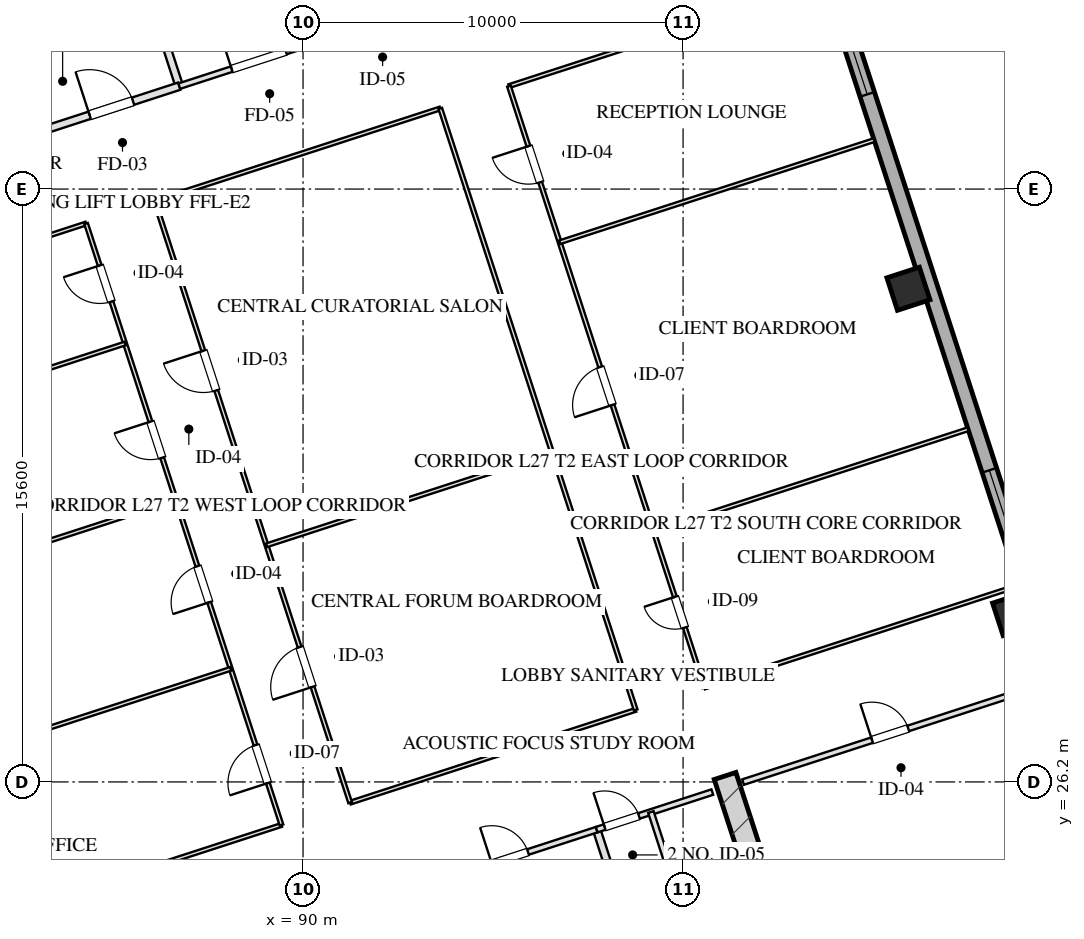
"""IFC4 building model, lengths in metres.
Left out: names, types, materials, properties, quantities, classifications, styles, units other than length and angle.
Written with IfcOpenShell. Run it as: python <this file> out.ifc"""

import sys

from ifc_helpers import new_model, si_unit, direction, frame, frame_2d, origin, origin_2d, place, context, subcontext, project, spatial, rectangle, hollow_rectangle, extrude, element, fill, save


model = new_model("IFC4")
c1 = context("Model", 3, precision=1e-05, world=origin(), true_north=direction((0.0, 1.0)))
c2 = subcontext(c1, "Body", "Model", "MODEL_VIEW")
j1 = project(units=[si_unit("LENGTHUNIT", "METRE"), si_unit("PLANEANGLEUNIT", "RADIAN")], contexts=[c1])
p1 = place(None, origin())
s1 = spatial("IfcSite", under=j1, at=p1, CompositionType="ELEMENT")
p2 = place(p1, origin())
s2 = spatial("IfcBuilding", under=s1, at=p2, CompositionType="ELEMENT")
p3 = place(p2, frame((0.0, 0.0, 106.95)))
s3 = spatial("IfcBuildingStorey", under=s2, at=p3, CompositionType="ELEMENT", Elevation=106.95)
p4 = place(p3, frame((101.105, 26.358, 0.0), z_axis=(0.0, 0.0, 1.0), x_axis=(0.309010370028, -0.95105866865, 0.0)))
e1 = element("IfcWall", 1, at=p4, inside=s3, PredefinedType="SHEAR", context=c2, shape_type="SweptSolid", body=[
    extrude(rectangle(XDim=9.48, YDim=0.6, at=frame_2d((4.74, 0.0))), origin(), (0.0, 0.0, 1.0), 3.45),
])
for number, where, z_axis, x_axis in (
    (2, (108.711, 30.616, 0.0), (0.0, 0.0, 1.0), (0.951, 0.309, 0.0)),
    (3, (105.93, 39.176, 0.0), (0.0, 0.0, 1.0), (0.951, 0.309, 0.0)),
):
    element("IfcColumn", number, at=place(p3, frame(where, z_axis=z_axis, x_axis=x_axis)), inside=s3, PredefinedType="COLUMN", context=c2, shape_type="SweptSolid", body=[
        extrude(hollow_rectangle(XDim=0.9, YDim=0.9, WallThickness=0.032, at=origin_2d()), origin(), (0.0, 0.0, 1.0), 3.451),
    ])
p5 = place(p3, frame((99.284, 61.41, 0.0), z_axis=(0.0, 0.0, 1.0), x_axis=(0.309017542002, -0.95105633836, 0.0)))
e4 = element("IfcWall", 4, at=p5, inside=s3, PredefinedType="SOLIDWALL", context=c2, shape_type="SweptSolid", body=[
    extrude(rectangle(XDim=46.4, YDim=0.4, at=frame_2d((23.2, 0.0))), origin(), (0.0, 0.0, 1.0), 2.61),
])
p6 = place(p5, frame((28.4, 0.0, 0.75)))
e5 = element("IfcOpeningElement", 5, at=p6, cuts=e4, PredefinedType="OPENING", context=c2, shape_type="SweptSolid", body=[
    extrude(rectangle(XDim=2.4, YDim=1.46, at=frame_2d((1.2, 0.73))), frame((0.0, 0.21, 0.0), z_axis=(0.0, -1.0, 0.0), x_axis=(1.0, 0.0, 0.0)), (0.0, 0.0, 1.0), 0.42),
])
p7 = place(p5, frame((15.6, 0.0, 0.75)))
e6 = element("IfcOpeningElement", 6, at=p7, cuts=e4, PredefinedType="OPENING", context=c2, shape_type="SweptSolid", body=[
    extrude(rectangle(XDim=2.4, YDim=1.46, at=frame_2d((1.2, 0.73))), frame((0.0, 0.21, 0.0), z_axis=(0.0, -1.0, 0.0), x_axis=(1.0, 0.0, 0.0)), (0.0, 0.0, 1.0), 0.42),
])
p8 = place(p3, frame((97.727, 24.944, 0.0), z_axis=(0.0, 0.0, 1.0), x_axis=(0.309016001439, -0.951056838919, 0.0)))
e7 = element("IfcWall", 7, at=p8, inside=s3, PredefinedType="PARTITIONING", context=c2, shape_type="SweptSolid", body=[
    extrude(rectangle(XDim=8.43, YDim=0.2, at=frame_2d((4.215, 0.0))), origin(), (0.0, 0.0, 1.0), 3.175),
])
p9 = place(p3, frame((93.542, 23.585, 0.0), z_axis=(0.0, 0.0, 1.0), x_axis=(0.951063829732, 0.308994485023, 0.0)))
e8 = element("IfcWall", 8, at=p9, inside=s3, PredefinedType="PARTITIONING", context=c2, shape_type="SweptSolid", body=[
    extrude(rectangle(XDim=4.4, YDim=0.15, at=frame_2d((2.2, 0.0))), origin(), (0.0, 0.0, 1.0), 3.175),
])
p10 = place(p9, frame((1.5, 0.0, 0.0)))
e9 = element("IfcOpeningElement", 9, at=p10, cuts=e8, PredefinedType="OPENING", context=c2, shape_type="SweptSolid", body=[
    extrude(rectangle(XDim=1.0, YDim=2.05, at=frame_2d((0.5, 1.025))), frame((0.0, 0.085, 0.0), z_axis=(0.0, -1.0, 0.0), x_axis=(1.0, 0.0, 0.0)), (0.0, 0.0, 1.0), 0.17),
])
p11 = place(p3, frame((97.727, 24.944, 0.0), z_axis=(0.0, 0.0, 1.0), x_axis=(0.951036872128, 0.309077446369, 0.0)))
e10 = element("IfcWall", 10, at=p11, inside=s3, PredefinedType="PARTITIONING", context=c2, shape_type="SweptSolid", body=[
    extrude(rectangle(XDim=3.2, YDim=0.15, at=frame_2d((1.6, 0.0))), origin(), (0.0, 0.0, 1.0), 3.175),
])
p12 = place(p11, frame((0.22, 0.0, 0.0)))
e11 = element("IfcOpeningElement", 11, at=p12, cuts=e10, PredefinedType="OPENING", context=c2, shape_type="SweptSolid", body=[
    extrude(rectangle(XDim=0.95, YDim=2.05, at=frame_2d((0.475, 1.025))), frame((0.0, 0.085, 0.0), z_axis=(0.0, -1.0, 0.0), x_axis=(1.0, 0.0, 0.0)), (0.0, 0.0, 1.0), 0.17),
])
p13 = place(p3, frame((99.153, 25.408, 0.0), z_axis=(0.0, 0.0, 1.0), x_axis=(0.309016001439, -0.951056838919, 0.0)))
e12 = element("IfcWall", 12, at=p13, inside=s3, PredefinedType="PARTITIONING", context=c2, shape_type="SweptSolid", body=[
    extrude(rectangle(XDim=8.43, YDim=0.15, at=frame_2d((4.215, 0.0))), origin(), (0.0, 0.0, 1.0), 3.175),
])
p14 = place(p13, frame((2.55, 0.0, 0.0)))
e13 = element("IfcOpeningElement", 13, at=p14, cuts=e12, PredefinedType="OPENING", context=c2, shape_type="SweptSolid", body=[
    extrude(rectangle(XDim=0.95, YDim=2.05, at=frame_2d((0.475, 1.025))), frame((0.0, 0.085, 0.0), z_axis=(0.0, -1.0, 0.0), x_axis=(1.0, 0.0, 0.0)), (0.0, 0.0, 1.0), 0.17),
])
p15 = place(p13, frame((4.7, 0.0, 0.0)))
e14 = element("IfcOpeningElement", 14, at=p15, cuts=e12, PredefinedType="OPENING", context=c2, shape_type="SweptSolid", body=[
    extrude(rectangle(XDim=0.9, YDim=2.05, at=frame_2d((0.45, 1.025))), frame((0.0, 0.085, 0.0), z_axis=(0.0, -1.0, 0.0), x_axis=(1.0, 0.0, 0.0)), (0.0, 0.0, 1.0), 0.17),
])
p16 = place(p13, frame((6.8, 0.0, 0.0)))
e15 = element("IfcOpeningElement", 15, at=p16, cuts=e12, PredefinedType="OPENING", context=c2, shape_type="SweptSolid", body=[
    extrude(rectangle(XDim=0.9, YDim=2.05, at=frame_2d((0.45, 1.025))), frame((0.0, 0.085, 0.0), z_axis=(0.0, -1.0, 0.0), x_axis=(1.0, 0.0, 0.0)), (0.0, 0.0, 1.0), 0.17),
])
p17 = place(p3, frame((86.743, 44.508, 0.0), z_axis=(0.0, 0.0, 1.0), x_axis=(-0.309016001439, 0.951056838919, 0.0)))
e16 = element("IfcWall", 16, at=p17, inside=s3, PredefinedType="PARTITIONING", context=c2, shape_type="SweptSolid", body=[
    extrude(rectangle(XDim=8.43, YDim=0.2, at=frame_2d((4.215, 0.0))), origin(), (0.0, 0.0, 1.0), 3.175),
])
p18 = place(p3, frame((83.101, 43.324, 0.0), z_axis=(0.0, 0.0, 1.0), x_axis=(0.951052804469, 0.309028417967, 0.0)))
e17 = element("IfcWall", 17, at=p18, inside=s3, PredefinedType="PARTITIONING", context=c2, shape_type="SweptSolid", body=[
    extrude(rectangle(XDim=3.83, YDim=0.2, at=frame_2d((1.915, 0.0))), origin(), (0.0, 0.0, 1.0), 3.175),
])
p19 = place(p18, frame((1.35, 0.0, 0.0)))
e18 = element("IfcOpeningElement", 18, at=p19, cuts=e17, PredefinedType="OPENING", context=c2, shape_type="SweptSolid", body=[
    extrude(rectangle(XDim=1.2, YDim=2.05, at=frame_2d((0.6, 1.025))), frame((0.0, 0.11, 0.0), z_axis=(0.0, -1.0, 0.0), x_axis=(1.0, 0.0, 0.0)), (0.0, 0.0, 1.0), 0.22),
])
p20 = place(p3, frame((86.743, 44.508, 0.0), z_axis=(0.0, 0.0, 1.0), x_axis=(0.951063829732, 0.308994485023, 0.0)))
e19 = element("IfcWall", 19, at=p20, inside=s3, PredefinedType="PARTITIONING", context=c2, shape_type="SweptSolid", body=[
    extrude(rectangle(XDim=4.4, YDim=0.15, at=frame_2d((2.2, 0.0))), origin(), (0.0, 0.0, 1.0), 3.175),
])
p21 = place(p20, frame((1.45, 0.0, 0.0)))
e20 = element("IfcOpeningElement", 20, at=p21, cuts=e19, PredefinedType="OPENING", context=c2, shape_type="SweptSolid", body=[
    extrude(rectangle(XDim=1.5, YDim=2.05, at=frame_2d((0.75, 1.025))), frame((0.0, 0.085, 0.0), z_axis=(0.0, -1.0, 0.0), x_axis=(1.0, 0.0, 0.0)), (0.0, 0.0, 1.0), 0.17),
])
p22 = place(p3, frame((101.578, 26.196, 0.0), z_axis=(0.0, 0.0, 1.0), x_axis=(0.951062770994, 0.308997743729, 0.0)))
e21 = element("IfcWall", 21, at=p22, inside=s3, PredefinedType="PARTITIONING", context=c2, shape_type="SweptSolid", body=[
    extrude(rectangle(XDim=8.5, YDim=0.15, at=frame_2d((4.25, 0.0))), origin(), (0.0, 0.0, 1.0), 3.175),
])
p23 = place(p22, frame((3.57, 0.0, 0.0)))
e22 = element("IfcOpeningElement", 22, at=p23, cuts=e21, PredefinedType="OPENING", context=c2, shape_type="SweptSolid", body=[
    extrude(rectangle(XDim=1.0, YDim=2.05, at=frame_2d((0.5, 1.025))), frame((0.0, 0.085, 0.0), z_axis=(0.0, -1.0, 0.0), x_axis=(1.0, 0.0, 0.0)), (0.0, 0.0, 1.0), 0.17),
])
p24 = place(p3, frame((76.308, 20.803, 0.0), z_axis=(0.0, 0.0, 1.0), x_axis=(0.951058377365, 0.309011266531, 0.0)))
e23 = element("IfcWall", 23, at=p24, inside=s3, PredefinedType="MOVABLE", context=c2, shape_type="SweptSolid", body=[
    extrude(rectangle(XDim=13.8, YDim=0.1, at=frame_2d((6.9, 0.0))), origin(), (0.0, 0.0, 1.0), 3.175),
])
p25 = place(p3, frame((91.24, 25.655, 0.0), z_axis=(0.0, 0.0, 1.0), x_axis=(0.951060182336, 0.309005711233, 0.0)))
e24 = element("IfcWall", 24, at=p25, inside=s3, PredefinedType="MOVABLE", context=c2, shape_type="SweptSolid", body=[
    extrude(rectangle(XDim=7.9, YDim=0.1, at=frame_2d((3.95, 0.0))), origin(), (0.0, 0.0, 1.0), 3.175),
])
p26 = place(p3, frame((100.56, 28.683, 0.0), z_axis=(0.0, 0.0, 1.0), x_axis=(0.951055307445, 0.309020714809, 0.0)))
e25 = element("IfcWall", 25, at=p26, inside=s3, PredefinedType="MOVABLE", context=c2, shape_type="SweptSolid", body=[
    extrude(rectangle(XDim=8.7, YDim=0.1, at=frame_2d((4.35, 0.0))), origin(), (0.0, 0.0, 1.0), 3.175),
])
p27 = place(p3, frame((71.166, 36.629, 0.0), z_axis=(0.0, 0.0, 1.0), x_axis=(0.951056688031, 0.309016465825, 0.0)))
e26 = element("IfcWall", 26, at=p27, inside=s3, PredefinedType="MOVABLE", context=c2, shape_type="SweptSolid", body=[
    extrude(rectangle(XDim=13.8, YDim=0.1, at=frame_2d((6.9, 0.0))), origin(), (0.0, 0.0, 1.0), 3.175),
])
p28 = place(p3, frame((86.097, 41.48, 0.0), z_axis=(0.0, 0.0, 1.0), x_axis=(0.951060182336, 0.309005711233, 0.0)))
e27 = element("IfcWall", 27, at=p28, inside=s3, PredefinedType="MOVABLE", context=c2, shape_type="SweptSolid", body=[
    extrude(rectangle(XDim=7.9, YDim=0.1, at=frame_2d((3.95, 0.0))), origin(), (0.0, 0.0, 1.0), 3.175),
])
p29 = place(p3, frame((95.418, 44.509, 0.0), z_axis=(0.0, 0.0, 1.0), x_axis=(0.951055307445, 0.309020714809, 0.0)))
e28 = element("IfcWall", 28, at=p29, inside=s3, PredefinedType="MOVABLE", context=c2, shape_type="SweptSolid", body=[
    extrude(rectangle(XDim=8.7, YDim=0.1, at=frame_2d((4.35, 0.0))), origin(), (0.0, 0.0, 1.0), 3.175),
])
p30 = place(p3, frame((89.433, 25.067, 0.0), z_axis=(0.0, 0.0, 1.0), x_axis=(-0.30901773025, 0.951056277195, 0.0)))
e29 = element("IfcWall", 29, at=p30, inside=s3, PredefinedType="MOVABLE", context=c2, shape_type="SweptSolid", body=[
    extrude(rectangle(XDim=16.64, YDim=0.1, at=frame_2d((8.32, 0.0))), origin(), (0.0, 0.0, 1.0), 3.175),
])
p31 = place(p30, frame((1.16, 0.0, 0.0)))
e30 = element("IfcOpeningElement", 30, at=p31, cuts=e29, PredefinedType="OPENING", context=c2, shape_type="SweptSolid", body=[
    extrude(rectangle(XDim=1.05, YDim=2.05, at=frame_2d((0.525, 1.025))), frame((0.0, 0.06, 0.0), z_axis=(0.0, -1.0, 0.0), x_axis=(1.0, 0.0, 0.0)), (0.0, 0.0, 1.0), 0.12),
])
p32 = place(p30, frame((6.16, 0.0, 0.0)))
e31 = element("IfcOpeningElement", 31, at=p32, cuts=e29, PredefinedType="OPENING", context=c2, shape_type="SweptSolid", body=[
    extrude(rectangle(XDim=1.0, YDim=2.05, at=frame_2d((0.5, 1.025))), frame((0.0, 0.06, 0.0), z_axis=(0.0, -1.0, 0.0), x_axis=(1.0, 0.0, 0.0)), (0.0, 0.0, 1.0), 0.12),
])
p33 = place(p30, frame((10.16, 0.0, 0.0)))
e32 = element("IfcOpeningElement", 32, at=p33, cuts=e29, PredefinedType="OPENING", context=c2, shape_type="SweptSolid", body=[
    extrude(rectangle(XDim=1.0, YDim=2.05, at=frame_2d((0.5, 1.025))), frame((0.0, 0.06, 0.0), z_axis=(0.0, -1.0, 0.0), x_axis=(1.0, 0.0, 0.0)), (0.0, 0.0, 1.0), 0.12),
])
p34 = place(p30, frame((14.48, 0.0, 0.0)))
e33 = element("IfcOpeningElement", 33, at=p34, cuts=e29, PredefinedType="OPENING", context=c2, shape_type="SweptSolid", body=[
    extrude(rectangle(XDim=1.0, YDim=2.05, at=frame_2d((0.5, 1.025))), frame((0.0, 0.06, 0.0), z_axis=(0.0, -1.0, 0.0), x_axis=(1.0, 0.0, 0.0)), (0.0, 0.0, 1.0), 0.12),
])
p35 = place(p3, frame((91.24, 25.655, 0.0), z_axis=(0.0, 0.0, 1.0), x_axis=(-0.30901773025, 0.951056277195, 0.0)))
e34 = element("IfcWall", 34, at=p35, inside=s3, PredefinedType="MOVABLE", context=c2, shape_type="SweptSolid", body=[
    extrude(rectangle(XDim=16.64, YDim=0.1, at=frame_2d((8.32, 0.0))), origin(), (0.0, 0.0, 1.0), 3.175),
])
p36 = place(p35, frame((3.204, 0.0, 0.0)))
e35 = element("IfcOpeningElement", 35, at=p36, cuts=e34, PredefinedType="OPENING", context=c2, shape_type="SweptSolid", body=[
    extrude(rectangle(XDim=1.1, YDim=2.05, at=frame_2d((0.55, 1.025))), frame((0.0, 0.06, 0.0), z_axis=(0.0, -1.0, 0.0), x_axis=(1.0, 0.0, 0.0)), (0.0, 0.0, 1.0), 0.12),
])
p37 = place(p35, frame((11.404, 0.0, 0.0)))
e36 = element("IfcOpeningElement", 36, at=p37, cuts=e34, PredefinedType="OPENING", context=c2, shape_type="SweptSolid", body=[
    extrude(rectangle(XDim=1.1, YDim=2.05, at=frame_2d((0.55, 1.025))), frame((0.0, 0.06, 0.0), z_axis=(0.0, -1.0, 0.0), x_axis=(1.0, 0.0, 0.0)), (0.0, 0.0, 1.0), 0.12),
])
p38 = place(p3, frame((98.753, 28.096, 0.0), z_axis=(0.0, 0.0, 1.0), x_axis=(-0.30901773025, 0.951056277195, 0.0)))
e37 = element("IfcWall", 37, at=p38, inside=s3, PredefinedType="MOVABLE", context=c2, shape_type="SweptSolid", body=[
    extrude(rectangle(XDim=16.64, YDim=0.1, at=frame_2d((8.32, 0.0))), origin(), (0.0, 0.0, 1.0), 3.175),
])
p39 = place(p3, frame((100.56, 28.683, 0.0), z_axis=(0.0, 0.0, 1.0), x_axis=(-0.309004459387, 0.951060589068, 0.0)))
e38 = element("IfcWall", 38, at=p39, inside=s3, PredefinedType="MOVABLE", context=c2, shape_type="SweptSolid", body=[
    extrude(rectangle(XDim=16.64, YDim=0.1, at=frame_2d((8.32, 0.0))), origin(), (0.0, 0.0, 1.0), 3.175),
])
p40 = place(p39, frame((1.66, 0.0, 0.0)))
e39 = element("IfcOpeningElement", 39, at=p40, cuts=e38, PredefinedType="OPENING", context=c2, shape_type="SweptSolid", body=[
    extrude(rectangle(XDim=0.85, YDim=2.05, at=frame_2d((0.425, 1.025))), frame((0.0, 0.06, 0.0), z_axis=(0.0, -1.0, 0.0), x_axis=(1.0, 0.0, 0.0)), (0.0, 0.0, 1.0), 0.12),
])
p41 = place(p39, frame((7.82, 0.0, 0.0)))
e40 = element("IfcOpeningElement", 40, at=p41, cuts=e38, PredefinedType="OPENING", context=c2, shape_type="SweptSolid", body=[
    extrude(rectangle(XDim=1.05, YDim=2.05, at=frame_2d((0.525, 1.025))), frame((0.0, 0.06, 0.0), z_axis=(0.0, -1.0, 0.0), x_axis=(1.0, 0.0, 0.0)), (0.0, 0.0, 1.0), 0.12),
])
p42 = place(p39, frame((13.98, 0.0, 0.0)))
e41 = element("IfcOpeningElement", 41, at=p42, cuts=e38, PredefinedType="OPENING", context=c2, shape_type="SweptSolid", body=[
    extrude(rectangle(XDim=1.0, YDim=2.05, at=frame_2d((0.5, 1.025))), frame((0.0, 0.06, 0.0), z_axis=(0.0, -1.0, 0.0), x_axis=(1.0, 0.0, 0.0)), (0.0, 0.0, 1.0), 0.12),
])
p43 = place(p3, frame((89.039, 32.426, 0.0), z_axis=(0.0, 0.0, 1.0), x_axis=(0.951051099951, 0.309033663672, 0.0)))
e42 = element("IfcWall", 42, at=p43, inside=s3, PredefinedType="MOVABLE", context=c2, shape_type="SweptSolid", body=[
    extrude(rectangle(XDim=7.9, YDim=0.1, at=frame_2d((3.95, 0.0))), origin(), (0.0, 0.0, 1.0), 3.175),
])
p44 = place(p3, frame((74.973, 24.912, 0.0), z_axis=(0.0, 0.0, 1.0), x_axis=(0.951058377365, 0.309011266531, 0.0)))
e43 = element("IfcWall", 43, at=p44, inside=s3, PredefinedType="MOVABLE", context=c2, shape_type="SweptSolid", body=[
    extrude(rectangle(XDim=13.8, YDim=0.1, at=frame_2d((6.9, 0.0))), origin(), (0.0, 0.0, 1.0), 3.175),
])
for number, where, z_axis, x_axis in (
    (44, (73.527, 29.363, 0.0), (0.0, 0.0, 1.0), (0.951, 0.309, 0.0)),
    (45, (72.192, 33.471, 0.0), (0.0, 0.0, 1.0), (0.951, 0.309, 0.0)),
):
    element("IfcWall", number, at=place(p3, frame(where, z_axis=z_axis, x_axis=x_axis)), inside=s3, PredefinedType="MOVABLE", context=c2, shape_type="SweptSolid", body=[
        extrude(rectangle(XDim=13.8, YDim=0.1, at=frame_2d((6.9, 0.0))), origin(), (0.0, 0.0, 1.0), 3.175),
    ])
p45 = place(p3, frame((99.225, 32.792, 0.0), z_axis=(0.0, 0.0, 1.0), x_axis=(0.951055307445, 0.309020714809, 0.0)))
e46 = element("IfcWall", 46, at=p45, inside=s3, PredefinedType="MOVABLE", context=c2, shape_type="SweptSolid", body=[
    extrude(rectangle(XDim=8.7, YDim=0.1, at=frame_2d((4.35, 0.0))), origin(), (0.0, 0.0, 1.0), 3.175),
])
p46 = place(p3, frame((96.753, 40.4, 0.0), z_axis=(0.0, 0.0, 1.0), x_axis=(0.951057987102, 0.309012467661, 0.0)))
e47 = element("IfcWall", 47, at=p46, inside=s3, PredefinedType="MOVABLE", context=c2, shape_type="SweptSolid", body=[
    extrude(rectangle(XDim=8.7, YDim=0.1, at=frame_2d((4.35, 0.0))), origin(), (0.0, 0.0, 1.0), 3.175),
])
p47 = place(p6, origin())
e48 = element("IfcWindow", 48, at=p47, inside=s3, PartitioningType="TRIPLE_PANEL_VERTICAL", PredefinedType="WINDOW", context=c2, shape_type="SweptSolid", body=[
    extrude(rectangle(XDim=2.4, YDim=1.46, at=frame_2d((1.2, 0.73))), frame((0.0, 0.03, 0.0), z_axis=(0.0, -1.0, 0.0), x_axis=(1.0, 0.0, 0.0)), (0.0, 0.0, 1.0), 0.06),
])
fill(e5, e48)
p48 = place(p7, origin())
e49 = element("IfcWindow", 49, at=p48, inside=s3, PartitioningType="TRIPLE_PANEL_VERTICAL", PredefinedType="WINDOW", context=c2, shape_type="SweptSolid", body=[
    extrude(rectangle(XDim=2.4, YDim=1.46, at=frame_2d((1.2, 0.73))), frame((0.0, 0.03, 0.0), z_axis=(0.0, -1.0, 0.0), x_axis=(1.0, 0.0, 0.0)), (0.0, 0.0, 1.0), 0.06),
])
fill(e6, e49)
p49 = place(p10, origin())
e50 = element("IfcDoor", 50, at=p49, inside=s3, OperationType="SINGLE_SWING_LEFT", PredefinedType="DOOR", context=c2, shape_type="SweptSolid", body=[
    extrude(rectangle(XDim=1.0, YDim=2.05, at=frame_2d((0.5, 1.025))), frame((0.0, 0.025, 0.0), z_axis=(0.0, -1.0, 0.0), x_axis=(1.0, 0.0, 0.0)), (0.0, 0.0, 1.0), 0.05),
])
fill(e9, e50)
p50 = place(p12, origin())
e51 = element("IfcDoor", 51, at=p50, inside=s3, OperationType="SINGLE_SWING_LEFT", PredefinedType="DOOR", context=c2, shape_type="SweptSolid", body=[
    extrude(rectangle(XDim=0.95, YDim=2.05, at=frame_2d((0.475, 1.025))), frame((0.0, 0.025, 0.0), z_axis=(0.0, -1.0, 0.0), x_axis=(1.0, 0.0, 0.0)), (0.0, 0.0, 1.0), 0.05),
])
fill(e11, e51)
p51 = place(p19, origin())
e52 = element("IfcDoor", 52, at=p51, inside=s3, OperationType="SINGLE_SWING_LEFT", PredefinedType="DOOR", context=c2, shape_type="SweptSolid", body=[
    extrude(rectangle(XDim=1.2, YDim=2.05, at=frame_2d((0.6, 1.025))), frame((0.0, 0.025, 0.0), z_axis=(0.0, -1.0, 0.0), x_axis=(1.0, 0.0, 0.0)), (0.0, 0.0, 1.0), 0.05),
])
fill(e18, e52)
p52 = place(p21, origin())
e53 = element("IfcDoor", 53, at=p52, inside=s3, OperationType="SINGLE_SWING_LEFT", PredefinedType="DOOR", context=c2, shape_type="SweptSolid", body=[
    extrude(rectangle(XDim=1.5, YDim=2.05, at=frame_2d((0.75, 1.025))), frame((0.0, 0.025, 0.0), z_axis=(0.0, -1.0, 0.0), x_axis=(1.0, 0.0, 0.0)), (0.0, 0.0, 1.0), 0.05),
])
fill(e20, e53)
p53 = place(p23, origin())
e54 = element("IfcDoor", 54, at=p53, inside=s3, OperationType="SINGLE_SWING_LEFT", PredefinedType="DOOR", context=c2, shape_type="SweptSolid", body=[
    extrude(rectangle(XDim=1.0, YDim=2.05, at=frame_2d((0.5, 1.025))), frame((0.0, 0.025, 0.0), z_axis=(0.0, -1.0, 0.0), x_axis=(1.0, 0.0, 0.0)), (0.0, 0.0, 1.0), 0.05),
])
fill(e22, e54)
p54 = place(p31, origin())
e55 = element("IfcDoor", 55, at=p54, inside=s3, OperationType="SINGLE_SWING_LEFT", PredefinedType="DOOR", context=c2, shape_type="SweptSolid", body=[
    extrude(rectangle(XDim=1.05, YDim=2.05, at=frame_2d((0.525, 1.025))), frame((0.0, 0.025, 0.0), z_axis=(0.0, -1.0, 0.0), x_axis=(1.0, 0.0, 0.0)), (0.0, 0.0, 1.0), 0.05),
])
fill(e30, e55)
p55 = place(p32, origin())
e56 = element("IfcDoor", 56, at=p55, inside=s3, OperationType="SINGLE_SWING_LEFT", PredefinedType="DOOR", context=c2, shape_type="SweptSolid", body=[
    extrude(rectangle(XDim=1.0, YDim=2.05, at=frame_2d((0.5, 1.025))), frame((0.0, 0.025, 0.0), z_axis=(0.0, -1.0, 0.0), x_axis=(1.0, 0.0, 0.0)), (0.0, 0.0, 1.0), 0.05),
])
fill(e31, e56)
p56 = place(p33, origin())
e57 = element("IfcDoor", 57, at=p56, inside=s3, OperationType="SINGLE_SWING_RIGHT", PredefinedType="DOOR", context=c2, shape_type="SweptSolid", body=[
    extrude(rectangle(XDim=1.0, YDim=2.05, at=frame_2d((0.5, 1.025))), frame((0.0, 0.025, 0.0), z_axis=(0.0, -1.0, 0.0), x_axis=(1.0, 0.0, 0.0)), (0.0, 0.0, 1.0), 0.05),
])
fill(e32, e57)
p57 = place(p34, origin())
e58 = element("IfcDoor", 58, at=p57, inside=s3, OperationType="SINGLE_SWING_RIGHT", PredefinedType="DOOR", context=c2, shape_type="SweptSolid", body=[
    extrude(rectangle(XDim=1.0, YDim=2.05, at=frame_2d((0.5, 1.025))), frame((0.0, 0.025, 0.0), z_axis=(0.0, -1.0, 0.0), x_axis=(1.0, 0.0, 0.0)), (0.0, 0.0, 1.0), 0.05),
])
fill(e33, e58)
p58 = place(p36, origin())
e59 = element("IfcDoor", 59, at=p58, inside=s3, OperationType="SINGLE_SWING_LEFT", PredefinedType="DOOR", context=c2, shape_type="SweptSolid", body=[
    extrude(rectangle(XDim=1.1, YDim=2.05, at=frame_2d((0.55, 1.025))), frame((0.0, 0.025, 0.0), z_axis=(0.0, -1.0, 0.0), x_axis=(1.0, 0.0, 0.0)), (0.0, 0.0, 1.0), 0.05),
])
fill(e35, e59)
p59 = place(p37, origin())
e60 = element("IfcDoor", 60, at=p59, inside=s3, OperationType="SINGLE_SWING_RIGHT", PredefinedType="DOOR", context=c2, shape_type="SweptSolid", body=[
    extrude(rectangle(XDim=1.1, YDim=2.05, at=frame_2d((0.55, 1.025))), frame((0.0, 0.025, 0.0), z_axis=(0.0, -1.0, 0.0), x_axis=(1.0, 0.0, 0.0)), (0.0, 0.0, 1.0), 0.05),
])
fill(e36, e60)
p60 = place(p40, origin())
e61 = element("IfcDoor", 61, at=p60, inside=s3, OperationType="SINGLE_SWING_RIGHT", PredefinedType="DOOR", context=c2, shape_type="SweptSolid", body=[
    extrude(rectangle(XDim=0.85, YDim=2.05, at=frame_2d((0.425, 1.025))), frame((0.0, 0.025, 0.0), z_axis=(0.0, -1.0, 0.0), x_axis=(1.0, 0.0, 0.0)), (0.0, 0.0, 1.0), 0.05),
])
fill(e39, e61)
p61 = place(p41, origin())
e62 = element("IfcDoor", 62, at=p61, inside=s3, OperationType="SINGLE_SWING_LEFT", PredefinedType="DOOR", context=c2, shape_type="SweptSolid", body=[
    extrude(rectangle(XDim=1.05, YDim=2.05, at=frame_2d((0.525, 1.025))), frame((0.0, 0.025, 0.0), z_axis=(0.0, -1.0, 0.0), x_axis=(1.0, 0.0, 0.0)), (0.0, 0.0, 1.0), 0.05),
])
fill(e40, e62)
p62 = place(p42, origin())
e63 = element("IfcDoor", 63, at=p62, inside=s3, OperationType="SINGLE_SWING_RIGHT", PredefinedType="DOOR", context=c2, shape_type="SweptSolid", body=[
    extrude(rectangle(XDim=1.0, YDim=2.05, at=frame_2d((0.5, 1.025))), frame((0.0, 0.025, 0.0), z_axis=(0.0, -1.0, 0.0), x_axis=(1.0, 0.0, 0.0)), (0.0, 0.0, 1.0), 0.05),
])
fill(e41, e63)
save(model, sys.argv[1])
